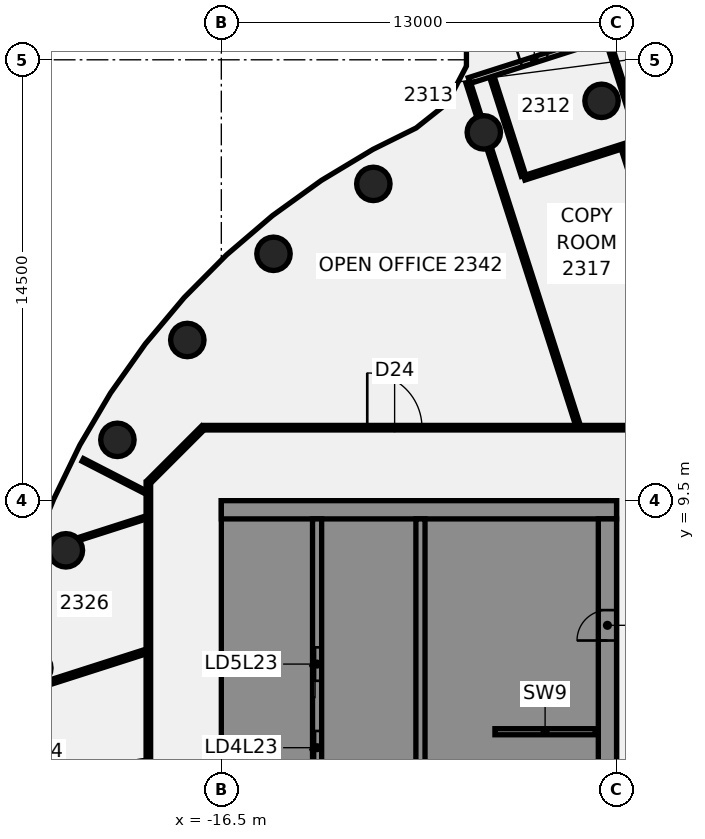
"""IFC4 building model, lengths in metres.
Left out: names, types, materials, properties, quantities, classifications, styles, units other than length and angle.
Written with IfcOpenShell. Run it as: python <this file> out.ifc"""

import sys

from ifc_helpers import new_model, si_unit, direction, frame, frame_2d, origin, origin_2d, place, context, subcontext, project, spatial, polyline, rectangle, circle, outline, extrude, element, fill, save


model = new_model("IFC4")
c1 = context("Model", 3, precision=1e-05, world=origin(), true_north=direction((0.0, 1.0)))
c2 = subcontext(c1, "Body", "Model", "MODEL_VIEW")
j1 = project(units=[si_unit("LENGTHUNIT", "METRE"), si_unit("PLANEANGLEUNIT", "RADIAN")], contexts=[c1])
p1 = place(None, origin())
s1 = spatial("IfcSite", under=j1, at=p1, CompositionType="ELEMENT")
p2 = place(p1, origin())
s2 = spatial("IfcBuilding", under=s1, at=p2, CompositionType="ELEMENT")
p3 = place(p2, frame((0.0, 0.0, 98.5)))
s3 = spatial("IfcBuildingStorey", under=s2, at=p3, CompositionType="ELEMENT", Elevation=98.5)
for number, where, z_axis, x_axis in (
    (1, (-3.994, 22.651, -0.14), (0.0, 0.0, 1.0), (1.0, 0.0, 0.0)),
    (2, (-7.866, 21.613, -0.14), (0.0, 0.0, 1.0), (1.0, 0.0, 0.0)),
    (3, (-11.5, 19.919, -0.14), (0.0, 0.0, 1.0), (1.0, 0.0, 0.0)),
    (4, (-14.784, 17.619, -0.14), (0.0, 0.0, 1.0), (1.0, 0.0, 0.0)),
    (5, (-17.619, 14.784, -0.14), (0.0, 0.0, 1.0), (1.0, 0.0, 0.0)),
    (6, (-19.919, 11.5, -0.14), (0.0, 0.0, 1.0), (1.0, 0.0, 0.0)),
    (7, (-21.613, 7.866, -0.14), (0.0, 0.0, 1.0), (1.0, 0.0, 0.0)),
):
    element("IfcColumn", number, at=place(p3, frame(where, z_axis=z_axis, x_axis=x_axis)), inside=s3, PredefinedType="COLUMN", context=c2, shape_type="SweptSolid", body=[
        extrude(circle(Radius=0.55, at=origin_2d()), origin(), (0.0, 0.0, 1.0), 3.75),
    ])
p4 = place(p3, frame((-8.381, 23.251, 0.0), z_axis=(0.0, 0.0, 1.0), x_axis=(0.305122152519, -0.952313221604, 0.0)))
e8 = element("IfcWall", 8, at=p4, inside=s3, PredefinedType="PARTITIONING", context=c2, shape_type="SweptSolid", body=[
    extrude(rectangle(XDim=1.176, YDim=0.15, at=frame_2d((0.588, 0.0))), origin(), (0.0, 0.0, 1.0), 3.01),
])
p5 = place(p3, frame((-7.692, 21.1, 0.0), z_axis=(0.0, 0.0, 1.0), x_axis=(0.305022732323, -0.952345070217, 0.0)))
e9 = element("IfcWall", 9, at=p5, inside=s3, PredefinedType="PARTITIONING", context=c2, shape_type="SweptSolid", body=[
    extrude(rectangle(XDim=9.575, YDim=0.15, at=frame_2d((4.788, 0.0))), origin(), (0.0, 0.0, 1.0), 3.01),
])
p6 = place(p3, frame((-7.604, 23.449, 0.0), z_axis=(0.0, 0.0, 1.0), x_axis=(0.305062851341, -0.952332219728, 0.0)))
e10 = element("IfcWall", 10, at=p6, inside=s3, PredefinedType="PARTITIONING", context=c2, shape_type="SweptSolid", body=[
    extrude(rectangle(XDim=3.425, YDim=0.15, at=frame_2d((1.712, 0.0))), origin(), (0.0, 0.0, 1.0), 3.01),
])
p7 = place(p3, frame((-5.025, 33.753, 0.0), z_axis=(0.0, 0.0, 1.0), x_axis=(0.305060744487, -0.952332894619, 0.0)))
e11 = element("IfcWall", 11, at=p7, inside=s3, PredefinedType="PARTITIONING", context=c2, shape_type="SweptSolid", body=[
    extrude(rectangle(XDim=11.251, YDim=0.15, at=frame_2d((5.625, 0.0))), origin(), (0.0, 0.0, 1.0), 3.01),
])
p8 = place(p7, frame((9.675, 0.0, 0.0)))
e12 = element("IfcOpeningElement", 12, at=p8, cuts=e11, PredefinedType="OPENING", context=c2, shape_type="SweptSolid", body=[
    extrude(rectangle(XDim=1.0, YDim=2.1, at=frame_2d((0.5, 1.05))), frame((0.0, 0.085, 0.0), z_axis=(0.0, -1.0, 0.0), x_axis=(1.0, 0.0, 0.0)), (0.0, 0.0, 1.0), 0.17),
])
p9 = place(p7, frame((0.975, 0.0, 0.0)))
e13 = element("IfcOpeningElement", 13, at=p9, cuts=e11, PredefinedType="OPENING", context=c2, shape_type="SweptSolid", body=[
    extrude(rectangle(XDim=1.8, YDim=2.1, at=frame_2d((0.9, 1.05))), frame((0.0, 0.085, 0.0), z_axis=(0.0, -1.0, 0.0), x_axis=(1.0, 0.0, 0.0)), (0.0, 0.0, 1.0), 0.17),
])
p10 = place(p7, frame((6.226, 0.0, 0.0)))
e14 = element("IfcOpeningElement", 14, at=p10, cuts=e11, PredefinedType="OPENING", context=c2, shape_type="SweptSolid", body=[
    extrude(rectangle(XDim=1.8, YDim=2.1, at=frame_2d((0.9, 1.05))), frame((0.0, 0.085, 0.0), z_axis=(0.0, -1.0, 0.0), x_axis=(1.0, 0.0, 0.0)), (0.0, 0.0, 1.0), 0.17),
])
p11 = place(p3, frame((-3.794, 24.665, 0.0), z_axis=(0.0, 0.0, 1.0), x_axis=(0.304920755811, -0.95237772584, 0.0)))
e15 = element("IfcWall", 15, at=p11, inside=s3, PredefinedType="PARTITIONING", context=c2, shape_type="SweptSolid", body=[
    extrude(rectangle(XDim=3.42, YDim=0.15, at=frame_2d((1.71, 0.0))), origin(), (0.0, 0.0, 1.0), 3.01),
])
p12 = place(p3, frame((-3.276, 21.082, 0.0), z_axis=(0.0, 0.0, 1.0), x_axis=(0.305069571087, -0.952330067149, 0.0)))
e16 = element("IfcWall", 16, at=p12, inside=s3, PredefinedType="PARTITIONING", context=c2, shape_type="SweptSolid", body=[
    extrude(rectangle(XDim=9.556, YDim=0.15, at=frame_2d((4.778, 0.0))), origin(), (0.0, 0.0, 1.0), 3.01),
])
p13 = place(p12, frame((5.625, 0.0, 0.0)))
e17 = element("IfcOpeningElement", 17, at=p13, cuts=e16, PredefinedType="OPENING", context=c2, shape_type="SweptSolid", body=[
    extrude(rectangle(XDim=0.9, YDim=2.1, at=frame_2d((0.45, 1.05))), frame((0.0, 0.085, 0.0), z_axis=(0.0, -1.0, 0.0), x_axis=(1.0, 0.0, 0.0)), (0.0, 0.0, 1.0), 0.17),
])
p14 = place(p3, frame((-21.056, 10.838, 0.0), z_axis=(0.0, 0.0, 1.0), x_axis=(0.889201507028, -0.45751577011, 0.0)))
e18 = element("IfcWall", 18, at=p14, inside=s3, PredefinedType="PARTITIONING", context=c2, shape_type="SweptSolid", body=[
    extrude(rectangle(XDim=2.335, YDim=0.1, at=frame_2d((1.167, 0.0))), origin(), (0.0, 0.0, 1.0), 3.01),
])
p15 = place(p3, frame((-17.065, 11.9, 0.0), z_axis=(0.0, 0.0, 1.0), x_axis=(1.0, 0.0, 0.0)))
e19 = element("IfcWall", 19, at=p15, inside=s3, PredefinedType="PARTITIONING", context=c2, shape_type="SweptSolid", body=[
    extrude(rectangle(XDim=34.165, YDim=0.15, at=frame_2d((17.083, 0.0))), origin(), (0.0, 0.0, 1.0), 3.01),
])
p16 = place(p15, frame((19.43, 0.0, 0.0)))
e20 = element("IfcOpeningElement", 20, at=p16, cuts=e19, PredefinedType="OPENING", context=c2, shape_type="SweptSolid", body=[
    extrude(rectangle(XDim=1.8, YDim=2.1, at=frame_2d((0.9, 1.05))), frame((0.0, 0.085, 0.0), z_axis=(0.0, -1.0, 0.0), x_axis=(1.0, 0.0, 0.0)), (0.0, 0.0, 1.0), 0.17),
])
p17 = place(p15, frame((30.831, 0.0, 0.0)))
e21 = element("IfcOpeningElement", 21, at=p17, cuts=e19, PredefinedType="OPENING", context=c2, shape_type="SweptSolid", body=[
    extrude(rectangle(XDim=1.8, YDim=2.1, at=frame_2d((0.9, 1.05))), frame((0.0, 0.085, 0.0), z_axis=(0.0, -1.0, 0.0), x_axis=(1.0, 0.0, 0.0)), (0.0, 0.0, 1.0), 0.17),
])
p18 = place(p15, frame((5.365, 0.0, 0.0)))
e22 = element("IfcOpeningElement", 22, at=p18, cuts=e19, PredefinedType="OPENING", context=c2, shape_type="SweptSolid", body=[
    extrude(rectangle(XDim=1.8, YDim=2.1, at=frame_2d((0.9, 1.05))), frame((0.0, 0.085, 0.0), z_axis=(0.0, -1.0, 0.0), x_axis=(1.0, 0.0, 0.0)), (0.0, 0.0, 1.0), 0.17),
])
p19 = place(p3, frame((-26.561, 2.11, 0.0), z_axis=(0.0, 0.0, 1.0), x_axis=(0.952353244945, 0.304997207926, 0.0)))
e23 = element("IfcWall", 23, at=p19, inside=s3, PredefinedType="PARTITIONING", context=c2, shape_type="SweptSolid", body=[
    extrude(rectangle(XDim=7.959, YDim=0.15, at=frame_2d((3.979, 0.0))), origin(), (0.0, 0.0, 1.0), 3.01),
])
p20 = place(p19, frame((2.45, 0.0, 0.0)))
e24 = element("IfcOpeningElement", 24, at=p20, cuts=e23, PredefinedType="OPENING", context=c2, shape_type="SweptSolid", body=[
    extrude(rectangle(XDim=0.9, YDim=2.1, at=frame_2d((0.45, 1.05))), frame((0.0, 0.085, 0.0), z_axis=(0.0, -1.0, 0.0), x_axis=(1.0, 0.0, 0.0)), (0.0, 0.0, 1.0), 0.17),
])
p21 = place(p3, frame((-21.214, 8.232, 0.0), z_axis=(0.0, 0.0, 1.0), x_axis=(0.95236031231, 0.30497513921, 0.0)))
e25 = element("IfcWall", 25, at=p21, inside=s3, PredefinedType="PARTITIONING", context=c2, shape_type="SweptSolid", body=[
    extrude(rectangle(XDim=2.354, YDim=0.1, at=frame_2d((1.177, 0.0))), origin(), (0.0, 0.0, 1.0), 3.01),
])
p22 = place(p3, frame((-8.347, 23.316, 0.0), z_axis=(0.0, 0.0, 1.0), x_axis=(0.952486806013, 0.304579848925, 0.0)))
e26 = element("IfcWall", 26, at=p22, inside=s3, PredefinedType="PARTITIONING", context=c2, shape_type="SweptSolid", body=[
    extrude(rectangle(XDim=14.246, YDim=0.2, at=frame_2d((7.123, 0.0))), origin(), (0.0, 0.0, 1.0), 3.01),
])
p23 = place(p22, frame((6.948, 0.0, 0.0)))
e27 = element("IfcOpeningElement", 27, at=p23, cuts=e26, PredefinedType="OPENING", context=c2, shape_type="SweptSolid", body=[
    extrude(rectangle(XDim=1.4, YDim=2.1, at=frame_2d((0.7, 1.05))), frame((0.0, 0.11, 0.0), z_axis=(0.0, -1.0, 0.0), x_axis=(1.0, 0.0, 0.0)), (0.0, 0.0, 1.0), 0.22),
])
p24 = place(p22, frame((1.797, 0.0, 0.0)))
e28 = element("IfcOpeningElement", 28, at=p24, cuts=e26, PredefinedType="OPENING", context=c2, shape_type="SweptSolid", body=[
    extrude(rectangle(XDim=0.9, YDim=2.1, at=frame_2d((0.45, 1.05))), frame((0.0, 0.11, 0.0), z_axis=(0.0, -1.0, 0.0), x_axis=(1.0, 0.0, 0.0)), (0.0, 0.0, 1.0), 0.22),
])
p25 = place(p3, frame((-6.537, 20.116, 0.0), z_axis=(0.0, 0.0, 1.0), x_axis=(0.952346864174, 0.305017131155, 0.0)))
e29 = element("IfcWall", 29, at=p25, inside=s3, PredefinedType="PARTITIONING", context=c2, shape_type="SweptSolid", body=[
    extrude(rectangle(XDim=4.0, YDim=0.15, at=frame_2d((2.0, 0.0))), origin(), (0.0, 0.0, 1.0), 3.01),
])
p26 = place(p3, frame((-18.872, 10.128, 0.0), z_axis=(0.0, 0.0, 1.0), x_axis=(0.707106781187, 0.707106781187, 0.0)))
e30 = element("IfcWall", 30, at=p26, inside=s3, PredefinedType="PARTITIONING", context=c2, shape_type="SweptSolid", body=[
    extrude(rectangle(XDim=2.505, YDim=0.15, at=frame_2d((1.253, 0.0))), origin(), (0.0, 0.0, 1.0), 3.01),
])
p27 = place(p3, frame((-18.9, -10.1, 0.0), z_axis=(0.0, 0.0, 1.0), x_axis=(0.0, 1.0, 0.0)))
e31 = element("IfcWall", 31, at=p27, inside=s3, PredefinedType="PARTITIONING", context=c2, shape_type="SweptSolid", body=[
    extrude(rectangle(XDim=20.2, YDim=0.15, at=frame_2d((10.1, 0.0))), origin(), (0.0, 0.0, 1.0), 3.01),
])
p28 = place(p27, frame((9.323, 0.0, 0.0)))
e32 = element("IfcOpeningElement", 32, at=p28, cuts=e31, PredefinedType="OPENING", context=c2, shape_type="SweptSolid", body=[
    extrude(rectangle(XDim=1.8, YDim=2.1, at=frame_2d((0.9, 1.05))), frame((0.0, 0.085, 0.0), z_axis=(0.0, -1.0, 0.0), x_axis=(1.0, 0.0, 0.0)), (0.0, 0.0, 1.0), 0.17),
])
p29 = place(p27, frame((5.363, 0.0, 0.0)))
e33 = element("IfcOpeningElement", 33, at=p29, cuts=e31, PredefinedType="OPENING", context=c2, shape_type="SweptSolid", body=[
    extrude(rectangle(XDim=0.9, YDim=2.1, at=frame_2d((0.45, 1.05))), frame((0.0, 0.085, 0.0), z_axis=(0.0, -1.0, 0.0), x_axis=(1.0, 0.0, 0.0)), (0.0, 0.0, 1.0), 0.17),
])
p30 = place(p3, origin())
e34 = element("IfcWall", 34, at=p30, inside=s3, PredefinedType="SHEAR", context=c2, shape_type="SweptSolid", body=[
    extrude(outline(polyline([(-13.5, -8.9), (-13.5, -8.125), (-15.9, -8.125), (-15.9, -5.625), (-13.5, -5.625), (-13.5, -5.375), (-15.9, -5.375), (-15.9, -2.875), (-13.5, -2.875), (-13.5, -2.625), (-15.9, -2.625), (-15.9, -0.125), (-13.5, -0.125), (-13.5, 0.125), (-15.9, 0.125), (-15.9, 2.625), (-13.5, 2.625), (-13.5, 2.875), (-15.9, 2.875), (-15.9, 5.375), (-13.5, 5.375), (-13.5, 5.625), (-15.9, 5.625), (-15.9, 8.125), (-13.5, 8.125), (-13.5, 8.9), (-15.9, 8.9), (-16.5, 8.9), (-16.5, -8.9), (-15.9, -8.9), (-13.5, -8.9)])), origin(), (0.0, 0.0, 1.0), 3.61),
])
p31 = place(p3, frame((-16.5, 9.2, 0.0), z_axis=(0.0, 0.0, 1.0), x_axis=(1.0, 0.0, 0.0)))
e35 = element("IfcWall", 35, at=p31, inside=s3, PredefinedType="SHEAR", context=c2, shape_type="SweptSolid", body=[
    extrude(rectangle(XDim=13.0, YDim=0.6, at=frame_2d((6.5, 0.0))), origin(), (0.0, 0.0, 1.0), 3.61),
])
p32 = place(p3, origin())
e36 = element("IfcWall", 36, at=p32, inside=s3, PredefinedType="SHEAR", context=c2, shape_type="SweptSolid", body=[
    extrude(outline(polyline([(-9.8, -5.375), (-9.8, -5.625), (-7.5, -5.625), (-7.2, -5.625), (-7.2, 8.9), (-7.5, 8.9), (-9.8, 8.9), (-9.8, 8.125), (-7.5, 8.125), (-7.5, 5.625), (-9.8, 5.625), (-9.8, 5.375), (-7.5, 5.375), (-7.5, 2.875), (-9.8, 2.875), (-9.8, 2.625), (-7.5, 2.625), (-7.5, 0.125), (-9.8, 0.125), (-9.8, -0.125), (-7.5, -0.125), (-7.5, -2.625), (-9.8, -2.625), (-9.8, -2.875), (-7.5, -2.875), (-7.5, -5.375), (-9.8, -5.375)])), origin(), (0.0, 0.0, 1.0), 3.61),
])
p33 = place(p3, frame((-7.5, 1.9, 0.0), z_axis=(0.0, 0.0, 1.0), x_axis=(1.0, 0.0, 0.0)))
e37 = element("IfcWall", 37, at=p33, inside=s3, PredefinedType="SHEAR", context=c2, shape_type="SweptSolid", body=[
    extrude(rectangle(XDim=3.3, YDim=0.2, at=frame_2d((1.65, 0.0))), origin(), (0.0, 0.0, 1.0), 3.61),
])
p34 = place(p3, frame((-13.35, -8.9, 0.0), z_axis=(0.0, 0.0, 1.0), x_axis=(0.0, 1.0, 0.0)))
e38 = element("IfcWall", 38, at=p34, inside=s3, PredefinedType="SHEAR", context=c2, shape_type="SweptSolid", body=[
    extrude(rectangle(XDim=17.8, YDim=0.3, at=frame_2d((8.9, 0.0))), origin(), (0.0, 0.0, 1.0), 3.61),
])
p35 = place(p34, frame((1.325, 0.0, 0.0)))
e39 = element("IfcOpeningElement", 39, at=p35, cuts=e38, PredefinedType="OPENING", context=c2, shape_type="SweptSolid", body=[
    extrude(rectangle(XDim=1.4, YDim=2.1, at=frame_2d((0.7, 1.05))), frame((0.0, 0.16, 0.0), z_axis=(0.0, -1.0, 0.0), x_axis=(1.0, 0.0, 0.0)), (0.0, 0.0, 1.0), 0.32),
])
p36 = place(p34, frame((4.225, 0.0, 0.0)))
e40 = element("IfcOpeningElement", 40, at=p36, cuts=e38, PredefinedType="OPENING", context=c2, shape_type="SweptSolid", body=[
    extrude(rectangle(XDim=1.1, YDim=2.1, at=frame_2d((0.55, 1.05))), frame((0.0, 0.16, 0.0), z_axis=(0.0, -1.0, 0.0), x_axis=(1.0, 0.0, 0.0)), (0.0, 0.0, 1.0), 0.32),
])
p37 = place(p34, frame((6.975, 0.0, 0.0)))
e41 = element("IfcOpeningElement", 41, at=p37, cuts=e38, PredefinedType="OPENING", context=c2, shape_type="SweptSolid", body=[
    extrude(rectangle(XDim=1.1, YDim=2.1, at=frame_2d((0.55, 1.05))), frame((0.0, 0.16, 0.0), z_axis=(0.0, -1.0, 0.0), x_axis=(1.0, 0.0, 0.0)), (0.0, 0.0, 1.0), 0.32),
])
p38 = place(p34, frame((9.725, 0.0, 0.0)))
e42 = element("IfcOpeningElement", 42, at=p38, cuts=e38, PredefinedType="OPENING", context=c2, shape_type="SweptSolid", body=[
    extrude(rectangle(XDim=1.1, YDim=2.1, at=frame_2d((0.55, 1.05))), frame((0.0, 0.16, 0.0), z_axis=(0.0, -1.0, 0.0), x_axis=(1.0, 0.0, 0.0)), (0.0, 0.0, 1.0), 0.32),
])
p39 = place(p34, frame((12.475, 0.0, 0.0)))
e43 = element("IfcOpeningElement", 43, at=p39, cuts=e38, PredefinedType="OPENING", context=c2, shape_type="SweptSolid", body=[
    extrude(rectangle(XDim=1.1, YDim=2.1, at=frame_2d((0.55, 1.05))), frame((0.0, 0.16, 0.0), z_axis=(0.0, -1.0, 0.0), x_axis=(1.0, 0.0, 0.0)), (0.0, 0.0, 1.0), 0.32),
])
p40 = place(p3, frame((-9.95, -8.9, 0.0), z_axis=(0.0, 0.0, 1.0), x_axis=(0.0, 1.0, 0.0)))
e44 = element("IfcWall", 44, at=p40, inside=s3, PredefinedType="SHEAR", context=c2, shape_type="SweptSolid", body=[
    extrude(rectangle(XDim=17.8, YDim=0.3, at=frame_2d((8.9, 0.0))), origin(), (0.0, 0.0, 1.0), 3.61),
])
p41 = place(p3, frame((-3.8, -8.9, 0.0), z_axis=(0.0, 0.0, 1.0), x_axis=(0.0, 1.0, 0.0)))
e45 = element("IfcWall", 45, at=p41, inside=s3, PredefinedType="SHEAR", context=c2, shape_type="SweptSolid", body=[
    extrude(rectangle(XDim=17.8, YDim=0.6, at=frame_2d((8.9, 0.0))), origin(), (0.0, 0.0, 1.0), 3.61),
])
p42 = place(p41, frame((1.25, 0.0, 0.0)))
e46 = element("IfcOpeningElement", 46, at=p42, cuts=e45, PredefinedType="OPENING", context=c2, shape_type="SweptSolid", body=[
    extrude(rectangle(XDim=1.8, YDim=2.1, at=frame_2d((0.9, 1.05))), frame((0.0, 0.31, 0.0), z_axis=(0.0, -1.0, 0.0), x_axis=(1.0, 0.0, 0.0)), (0.0, 0.0, 1.0), 0.62),
])
p43 = place(p41, frame((13.8, 0.0, 0.0)))
e47 = element("IfcOpeningElement", 47, at=p43, cuts=e45, PredefinedType="OPENING", context=c2, shape_type="SweptSolid", body=[
    extrude(rectangle(XDim=1.0, YDim=2.1, at=frame_2d((0.5, 1.05))), frame((0.0, 0.31, 0.0), z_axis=(0.0, -1.0, 0.0), x_axis=(1.0, 0.0, 0.0)), (0.0, 0.0, 1.0), 0.62),
])
p44 = place(p18, origin())
e48 = element("IfcDoor", 48, at=p44, inside=s3, OperationType="DOUBLE_DOOR_SINGLE_SWING", PredefinedType="DOOR", context=c2, shape_type="SweptSolid", body=[
    extrude(rectangle(XDim=1.8, YDim=2.1, at=frame_2d((0.9, 1.05))), frame((0.0, 0.025, 0.0), z_axis=(0.0, -1.0, 0.0), x_axis=(1.0, 0.0, 0.0)), (0.0, 0.0, 1.0), 0.05),
])
fill(e22, e48)
p45 = place(p24, frame((0.9, 0.0, 0.0), z_axis=(0.0, 0.0, 1.0), x_axis=(-1.0, 0.0, 0.0)))
e49 = element("IfcDoor", 49, at=p45, inside=s3, OperationType="SINGLE_SWING_LEFT", PredefinedType="DOOR", context=c2, shape_type="SweptSolid", body=[
    extrude(rectangle(XDim=0.9, YDim=2.1, at=frame_2d((0.45, 1.05))), frame((0.0, 0.025, 0.0), z_axis=(0.0, -1.0, 0.0), x_axis=(1.0, 0.0, 0.0)), (0.0, 0.0, 1.0), 0.05),
])
fill(e28, e49)
p46 = place(p28, frame((1.8, 0.0, 0.0), z_axis=(0.0, 0.0, 1.0), x_axis=(-1.0, 0.0, 0.0)))
e50 = element("IfcDoor", 50, at=p46, inside=s3, OperationType="DOUBLE_DOOR_SINGLE_SWING", PredefinedType="DOOR", context=c2, shape_type="SweptSolid", body=[
    extrude(rectangle(XDim=1.8, YDim=2.1, at=frame_2d((0.9, 1.05))), frame((0.0, 0.025, 0.0), z_axis=(0.0, -1.0, 0.0), x_axis=(1.0, 0.0, 0.0)), (0.0, 0.0, 1.0), 0.05),
])
fill(e32, e50)
p47 = place(p43, origin())
e51 = element("IfcDoor", 51, at=p47, inside=s3, OperationType="SINGLE_SWING_LEFT", PredefinedType="DOOR", context=c2, shape_type="SweptSolid", body=[
    extrude(rectangle(XDim=1.0, YDim=2.1, at=frame_2d((0.5, 1.05))), frame((0.0, 0.025, 0.0), z_axis=(0.0, -1.0, 0.0), x_axis=(1.0, 0.0, 0.0)), (0.0, 0.0, 1.0), 0.05),
])
fill(e47, e51)
p48 = place(p38, origin())
e52 = element("IfcDoor", 52, at=p48, inside=s3, OperationType="SLIDING_TO_LEFT", PredefinedType="DOOR", context=c2, shape_type="SweptSolid", body=[
    extrude(rectangle(XDim=1.1, YDim=2.1, at=frame_2d((0.55, 1.05))), frame((0.0, 0.025, 0.0), z_axis=(0.0, -1.0, 0.0), x_axis=(1.0, 0.0, 0.0)), (0.0, 0.0, 1.0), 0.05),
])
fill(e42, e52)
p49 = place(p39, origin())
e53 = element("IfcDoor", 53, at=p49, inside=s3, OperationType="SLIDING_TO_LEFT", PredefinedType="DOOR", context=c2, shape_type="SweptSolid", body=[
    extrude(rectangle(XDim=1.1, YDim=2.1, at=frame_2d((0.55, 1.05))), frame((0.0, 0.025, 0.0), z_axis=(0.0, -1.0, 0.0), x_axis=(1.0, 0.0, 0.0)), (0.0, 0.0, 1.0), 0.05),
])
fill(e43, e53)
save(model, sys.argv[1])
